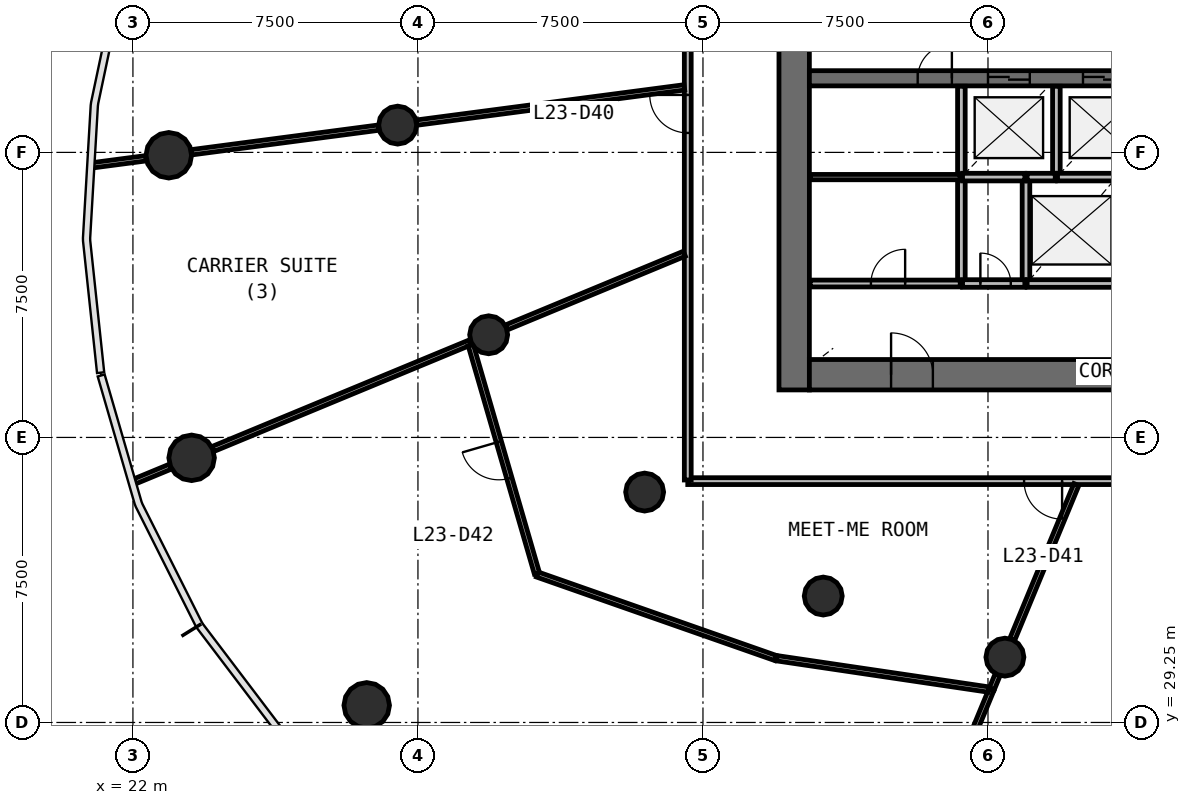
"""IFC4 building model, lengths in metres.
Left out: names, types, materials, properties, quantities, classifications, styles, units other than length and angle.
Written with IfcOpenShell. Run it as: python <this file> out.ifc"""

import sys

from ifc_helpers import new_model, si_unit, direction, frame, frame_2d, origin, origin_2d, place, context, subcontext, project, spatial, rectangle, circle, extrude, source, transform, mapped, element, fill, save


model = new_model("IFC4")
c1 = context("Model", 3, precision=1e-05, world=origin(), true_north=direction((0.0, 1.0)))
c2 = subcontext(c1, "Body", "Model", "MODEL_VIEW")
j1 = project(units=[si_unit("LENGTHUNIT", "METRE"), si_unit("PLANEANGLEUNIT", "RADIAN")], contexts=[c1])
p1 = place(None, origin())
s1 = spatial("IfcSite", under=j1, at=p1, CompositionType="ELEMENT")
p2 = place(p1, origin())
s2 = spatial("IfcBuilding", under=s1, at=p2, CompositionType="ELEMENT")
p3 = place(p2, frame((0.0, 0.0, 100.3)))
s3 = spatial("IfcBuildingStorey", under=s2, at=p3, CompositionType="ELEMENT", Elevation=100.3)
p4 = place(p3, frame((39.4, 58.0, 0.0), z_axis=(0.0, 0.0, 1.0), x_axis=(0.0, -1.0, 0.0)))
e1 = element("IfcWall", 1, at=p4, inside=s3, PredefinedType="SHEAR", context=c2, shape_type="SweptSolid", body=[
    extrude(rectangle(XDim=20.0, YDim=0.8, at=frame_2d((10.0, 0.0))), origin(), (0.0, 0.0, 1.0), 4.1),
])
p5 = place(p4, frame((9.1, 0.0, 0.0)))
e2 = element("IfcOpeningElement", 2, at=p5, cuts=e1, PredefinedType="OPENING", context=c2, shape_type="SweptSolid", body=[
    extrude(rectangle(XDim=1.8, YDim=2.1, at=frame_2d((0.9, 1.05))), frame((0.0, 0.41, 0.0), z_axis=(0.0, -1.0, 0.0), x_axis=(1.0, 0.0, 0.0)), (0.0, 0.0, 1.0), 0.82),
])
p6 = place(p3, frame((39.8, 38.4, 0.0), z_axis=(0.0, 0.0, 1.0), x_axis=(1.0, 0.0, 0.0)))
e3 = element("IfcWall", 3, at=p6, inside=s3, PredefinedType="SHEAR", context=c2, shape_type="SweptSolid", body=[
    extrude(rectangle(XDim=24.4, YDim=0.8, at=frame_2d((12.2, 0.0))), origin(), (0.0, 0.0, 1.0), 4.1),
])
p7 = place(p6, frame((21.65, 0.0, 0.0)))
e4 = element("IfcOpeningElement", 4, at=p7, cuts=e3, PredefinedType="OPENING", context=c2, shape_type="SweptSolid", body=[
    extrude(rectangle(XDim=1.1, YDim=2.1, at=frame_2d((0.55, 1.05))), frame((0.0, 0.41, 0.0), z_axis=(0.0, -1.0, 0.0), x_axis=(1.0, 0.0, 0.0)), (0.0, 0.0, 1.0), 0.82),
])
p8 = place(p6, frame((2.15, 0.0, 0.0)))
e5 = element("IfcOpeningElement", 5, at=p8, cuts=e3, PredefinedType="OPENING", context=c2, shape_type="SweptSolid", body=[
    extrude(rectangle(XDim=1.1, YDim=2.1, at=frame_2d((0.55, 1.05))), frame((0.0, 0.41, 0.0), z_axis=(0.0, -1.0, 0.0), x_axis=(1.0, 0.0, 0.0)), (0.0, 0.0, 1.0), 0.82),
])
p9 = place(p3, frame((39.8, 46.2, 0.0), z_axis=(0.0, 0.0, 1.0), x_axis=(1.0, 0.0, 0.0)))
e6 = element("IfcWall", 6, at=p9, inside=s3, PredefinedType="SHEAR", context=c2, shape_type="SweptSolid", body=[
    extrude(rectangle(XDim=24.4, YDim=0.4, at=frame_2d((12.2, 0.0))), origin(), (0.0, 0.0, 1.0), 4.1),
])
p10 = place(p9, frame((4.7, 0.0, 0.0)))
e7 = element("IfcOpeningElement", 7, at=p10, cuts=e6, PredefinedType="OPENING", context=c2, shape_type="SweptSolid", body=[
    extrude(rectangle(XDim=1.1, YDim=2.1, at=frame_2d((0.55, 1.05))), frame((0.0, 0.21, 0.0), z_axis=(0.0, -1.0, 0.0), x_axis=(1.0, 0.0, 0.0)), (0.0, 0.0, 1.0), 0.42),
])
p11 = place(p9, frame((7.2, 0.0, 0.0)))
e8 = element("IfcOpeningElement", 8, at=p11, cuts=e6, PredefinedType="OPENING", context=c2, shape_type="SweptSolid", body=[
    extrude(rectangle(XDim=1.1, YDim=2.1, at=frame_2d((0.55, 1.05))), frame((0.0, 0.21, 0.0), z_axis=(0.0, -1.0, 0.0), x_axis=(1.0, 0.0, 0.0)), (0.0, 0.0, 1.0), 0.42),
])
p12 = place(p9, frame((9.7, 0.0, 0.0)))
e9 = element("IfcOpeningElement", 9, at=p12, cuts=e6, PredefinedType="OPENING", context=c2, shape_type="SweptSolid", body=[
    extrude(rectangle(XDim=1.1, YDim=2.1, at=frame_2d((0.55, 1.05))), frame((0.0, 0.21, 0.0), z_axis=(0.0, -1.0, 0.0), x_axis=(1.0, 0.0, 0.0)), (0.0, 0.0, 1.0), 0.42),
])
p13 = place(p9, frame((20.65, 0.0, 0.0)))
e10 = element("IfcOpeningElement", 10, at=p13, cuts=e6, PredefinedType="OPENING", context=c2, shape_type="SweptSolid", body=[
    extrude(rectangle(XDim=0.9, YDim=2.1, at=frame_2d((0.45, 1.05))), frame((0.0, 0.21, 0.0), z_axis=(0.0, -1.0, 0.0), x_axis=(1.0, 0.0, 0.0)), (0.0, 0.0, 1.0), 0.42),
])
p14 = place(p9, frame((2.85, 0.0, 0.0)))
e11 = element("IfcOpeningElement", 11, at=p14, cuts=e6, PredefinedType="OPENING", context=c2, shape_type="SweptSolid", body=[
    extrude(rectangle(XDim=0.9, YDim=2.1, at=frame_2d((0.45, 1.05))), frame((0.0, 0.21, 0.0), z_axis=(0.0, -1.0, 0.0), x_axis=(1.0, 0.0, 0.0)), (0.0, 0.0, 1.0), 0.42),
])
p15 = place(p9, frame((11.85, 0.0, 0.0)))
e12 = element("IfcOpeningElement", 12, at=p15, cuts=e6, PredefinedType="OPENING", context=c2, shape_type="SweptSolid", body=[
    extrude(rectangle(XDim=0.9, YDim=2.1, at=frame_2d((0.45, 1.05))), frame((0.0, 0.21, 0.0), z_axis=(0.0, -1.0, 0.0), x_axis=(1.0, 0.0, 0.0)), (0.0, 0.0, 1.0), 0.42),
])
m1 = source(origin(), c2, "Body", "SweptSolid", [
    extrude(circle(Radius=0.6, at=origin_2d()), origin(), (0.0, 0.0, 1.0), 4.1),
])
for number, where, z_axis, x_axis in (
    (13, (22.944, 44.175, 0.0), (0.0, 0.0, 1.0), (1.0, 0.0, 0.0)),
    (14, (23.544, 36.213, 0.0), (0.0, 0.0, 1.0), (1.0, 0.0, 0.0)),
    (15, (28.152, 29.701, 0.0), (0.0, 0.0, 1.0), (1.0, 0.0, 0.0)),
):
    element("IfcColumn", number, at=place(p3, frame(where, z_axis=z_axis, x_axis=x_axis)), inside=s3, PredefinedType="COLUMN", context=c2, shape_type="MappedRepresentation", body=[
        mapped(m1, transform((0.0, 0.0, 0.0), scale=1.0)),
    ])
m2 = source(origin(), c2, "Body", "SweptSolid", [
    extrude(circle(Radius=0.5, at=origin_2d()), origin(), (0.0, 0.0, 1.0), 4.1),
])
for number, where, z_axis, x_axis in (
    (16, (28.966, 44.968, 0.0), (0.0, 0.0, 1.0), (1.0, 0.0, 0.0)),
    (17, (31.361, 39.451, 0.0), (0.0, 0.0, 1.0), (1.0, 0.0, 0.0)),
    (18, (35.465, 35.312, 0.0), (0.0, 0.0, 1.0), (1.0, 0.0, 0.0)),
    (19, (40.165, 32.576, 0.0), (0.0, 0.0, 1.0), (1.0, 0.0, 0.0)),
    (20, (44.945, 30.969, 0.0), (0.0, 0.0, 1.0), (1.0, 0.0, 0.0)),
):
    element("IfcColumn", number, at=place(p3, frame(where, z_axis=z_axis, x_axis=x_axis)), inside=s3, PredefinedType="COLUMN", context=c2, shape_type="MappedRepresentation", body=[
        mapped(m2, transform((0.0, 0.0, 0.0), scale=1.0)),
    ])
for number, where, z_axis, x_axis in (
    (21, (43.8, 43.6, 0.0), (0.0, 0.0, 1.0), (0.0, -1.0, 0.0)),
    (22, (45.5, 43.6, 0.0), (0.0, 0.0, 1.0), (0.0, -1.0, 0.0)),
):
    element("IfcWall", number, at=place(p3, frame(where, z_axis=z_axis, x_axis=x_axis)), inside=s3, PredefinedType="SOLIDWALL", context=c2, shape_type="SweptSolid", body=[
        extrude(rectangle(XDim=2.8, YDim=0.2, at=frame_2d((1.4, 0.0))), origin(), (0.0, 0.0, 1.0), 3.7),
    ])
p16 = place(p3, frame((45.53, 40.8, 0.0), z_axis=(0.0, 0.0, 1.0), x_axis=(1.0, 0.0, 0.0)))
e23 = element("IfcWall", 23, at=p16, inside=s3, PredefinedType="SOLIDWALL", context=c2, shape_type="SweptSolid", body=[
    extrude(rectangle(XDim=2.34, YDim=0.2, at=frame_2d((1.17, 0.0))), origin(), (0.0, 0.0, 1.0), 3.7),
])
p17 = place(p3, frame((43.8, 45.99, 0.0), z_axis=(0.0, 0.0, 1.0), x_axis=(0.0, -1.0, 0.0)))
e24 = element("IfcWall", 24, at=p17, inside=s3, PredefinedType="SOLIDWALL", context=c2, shape_type="SweptSolid", body=[
    extrude(rectangle(XDim=2.36, YDim=0.2, at=frame_2d((1.18, 0.0))), origin(), (0.0, 0.0, 1.0), 3.7),
])
p18 = place(p3, frame((46.3, 43.6, 0.0), z_axis=(0.0, 0.0, 1.0), x_axis=(0.0, 1.0, 0.0)))
e25 = element("IfcWall", 25, at=p18, inside=s3, PredefinedType="SOLIDWALL", context=c2, shape_type="SweptSolid", body=[
    extrude(rectangle(XDim=2.39, YDim=0.2, at=frame_2d((1.195, 0.0))), origin(), (0.0, 0.0, 1.0), 3.7),
])
p19 = place(p3, frame((43.83, 43.6, 0.0), z_axis=(0.0, 0.0, 1.0), x_axis=(1.0, 0.0, 0.0)))
e26 = element("IfcWall", 26, at=p19, inside=s3, PredefinedType="SOLIDWALL", context=c2, shape_type="SweptSolid", body=[
    extrude(rectangle(XDim=1.64, YDim=0.2, at=frame_2d((0.82, 0.0))), origin(), (0.0, 0.0, 1.0), 3.7),
])
p20 = place(p3, frame((43.83, 40.8, 0.0), z_axis=(0.0, 0.0, 1.0), x_axis=(1.0, 0.0, 0.0)))
e27 = element("IfcWall", 27, at=p20, inside=s3, PredefinedType="SOLIDWALL", context=c2, shape_type="SweptSolid", body=[
    extrude(rectangle(XDim=1.64, YDim=0.2, at=frame_2d((0.82, 0.0))), origin(), (0.0, 0.0, 1.0), 3.7),
])
p21 = place(p20, frame((0.47, 0.0, 0.0)))
e28 = element("IfcOpeningElement", 28, at=p21, cuts=e27, PredefinedType="OPENING", context=c2, shape_type="SweptSolid", body=[
    extrude(rectangle(XDim=0.8, YDim=2.1, at=frame_2d((0.4, 1.05))), frame((0.0, 0.11, 0.0), z_axis=(0.0, -1.0, 0.0), x_axis=(1.0, 0.0, 0.0)), (0.0, 0.0, 1.0), 0.22),
])
p22 = place(p3, frame((46.33, 43.6, 0.0), z_axis=(0.0, 0.0, 1.0), x_axis=(1.0, 0.0, 0.0)))
e29 = element("IfcWall", 29, at=p22, inside=s3, PredefinedType="SOLIDWALL", context=c2, shape_type="SweptSolid", body=[
    extrude(rectangle(XDim=1.54, YDim=0.2, at=frame_2d((0.77, 0.0))), origin(), (0.0, 0.0, 1.0), 3.7),
])
p23 = place(p3, frame((45.53, 43.6, 0.0), z_axis=(0.0, 0.0, 1.0), x_axis=(1.0, 0.0, 0.0)))
e30 = element("IfcWall", 30, at=p23, inside=s3, PredefinedType="SOLIDWALL", context=c2, shape_type="SweptSolid", body=[
    extrude(rectangle(XDim=0.74, YDim=0.2, at=frame_2d((0.37, 0.0))), origin(), (0.0, 0.0, 1.0), 3.7),
])
p24 = place(p3, frame((67.4, 35.6, 0.0), z_axis=(0.0, 0.0, 1.0), x_axis=(-1.0, 0.0, 0.0)))
e31 = element("IfcWall", 31, at=p24, inside=s3, PredefinedType="PARTITIONING", context=c2, shape_type="SweptSolid", body=[
    extrude(rectangle(XDim=30.8, YDim=0.18, at=frame_2d((15.4, 0.0))), origin(), (0.0, 0.0, 1.0), 2.9),
])
p25 = place(p24, frame((9.05, 0.0, 0.0)))
e32 = element("IfcOpeningElement", 32, at=p25, cuts=e31, PredefinedType="OPENING", context=c2, shape_type="SweptSolid", body=[
    extrude(rectangle(XDim=0.9, YDim=2.1, at=frame_2d((0.45, 1.05))), frame((0.0, 0.1, 0.0), z_axis=(0.0, -1.0, 0.0), x_axis=(1.0, 0.0, 0.0)), (0.0, 0.0, 1.0), 0.2),
])
p26 = place(p24, frame((6.05, 0.0, 0.0)))
e33 = element("IfcOpeningElement", 33, at=p26, cuts=e31, PredefinedType="OPENING", context=c2, shape_type="SweptSolid", body=[
    extrude(rectangle(XDim=0.9, YDim=2.1, at=frame_2d((0.45, 1.05))), frame((0.0, 0.1, 0.0), z_axis=(0.0, -1.0, 0.0), x_axis=(1.0, 0.0, 0.0)), (0.0, 0.0, 1.0), 0.2),
])
p27 = place(p24, frame((2.45, 0.0, 0.0)))
e34 = element("IfcOpeningElement", 34, at=p27, cuts=e31, PredefinedType="OPENING", context=c2, shape_type="SweptSolid", body=[
    extrude(rectangle(XDim=0.9, YDim=2.1, at=frame_2d((0.45, 1.05))), frame((0.0, 0.1, 0.0), z_axis=(0.0, -1.0, 0.0), x_axis=(1.0, 0.0, 0.0)), (0.0, 0.0, 1.0), 0.2),
])
p28 = place(p24, frame((20.95, 0.0, 0.0)))
e35 = element("IfcOpeningElement", 35, at=p28, cuts=e31, PredefinedType="OPENING", context=c2, shape_type="SweptSolid", body=[
    extrude(rectangle(XDim=1.0, YDim=2.1, at=frame_2d((0.5, 1.05))), frame((0.0, 0.1, 0.0), z_axis=(0.0, -1.0, 0.0), x_axis=(1.0, 0.0, 0.0)), (0.0, 0.0, 1.0), 0.2),
])
p29 = place(p24, frame((14.95, 0.0, 0.0)))
e36 = element("IfcOpeningElement", 36, at=p29, cuts=e31, PredefinedType="OPENING", context=c2, shape_type="SweptSolid", body=[
    extrude(rectangle(XDim=1.0, YDim=2.1, at=frame_2d((0.5, 1.05))), frame((0.0, 0.1, 0.0), z_axis=(0.0, -1.0, 0.0), x_axis=(1.0, 0.0, 0.0)), (0.0, 0.0, 1.0), 0.2),
])
p30 = place(p24, frame((12.55, 0.0, 0.0)))
e37 = element("IfcOpeningElement", 37, at=p30, cuts=e31, PredefinedType="OPENING", context=c2, shape_type="SweptSolid", body=[
    extrude(rectangle(XDim=1.0, YDim=2.1, at=frame_2d((0.5, 1.05))), frame((0.0, 0.1, 0.0), z_axis=(0.0, -1.0, 0.0), x_axis=(1.0, 0.0, 0.0)), (0.0, 0.0, 1.0), 0.2),
])
p31 = place(p3, frame((36.6, 35.63, 0.0), z_axis=(0.0, 0.0, 1.0), x_axis=(0.0, 1.0, 0.0)))
e38 = element("IfcWall", 38, at=p31, inside=s3, PredefinedType="PARTITIONING", context=c2, shape_type="SweptSolid", body=[
    extrude(rectangle(XDim=23.583, YDim=0.18, at=frame_2d((11.791, 0.0))), origin(), (0.0, 0.0, 1.0), 2.9),
])
p32 = place(p31, frame((11.333, 0.0, 0.0)))
e39 = element("IfcOpeningElement", 39, at=p32, cuts=e38, PredefinedType="OPENING", context=c2, shape_type="SweptSolid", body=[
    extrude(rectangle(XDim=1.0, YDim=2.1, at=frame_2d((0.5, 1.05))), frame((0.0, 0.1, 0.0), z_axis=(0.0, -1.0, 0.0), x_axis=(1.0, 0.0, 0.0)), (0.0, 0.0, 1.0), 0.2),
])
p33 = place(p31, frame((9.133, 0.0, 0.0)))
e40 = element("IfcOpeningElement", 40, at=p33, cuts=e38, PredefinedType="OPENING", context=c2, shape_type="SweptSolid", body=[
    extrude(rectangle(XDim=1.0, YDim=2.1, at=frame_2d((0.5, 1.05))), frame((0.0, 0.1, 0.0), z_axis=(0.0, -1.0, 0.0), x_axis=(1.0, 0.0, 0.0)), (0.0, 0.0, 1.0), 0.2),
])
p34 = place(p3, frame((39.82, 40.8, 0.0), z_axis=(0.0, 0.0, 1.0), x_axis=(1.0, 0.0, 0.0)))
e41 = element("IfcWall", 41, at=p34, inside=s3, PredefinedType="PARTITIONING", context=c2, shape_type="SweptSolid", body=[
    extrude(rectangle(XDim=3.95, YDim=0.18, at=frame_2d((1.975, 0.0))), origin(), (0.0, 0.0, 1.0), 3.7),
])
p35 = place(p34, frame((1.6, 0.0, 0.0)))
e42 = element("IfcOpeningElement", 42, at=p35, cuts=e41, PredefinedType="OPENING", context=c2, shape_type="SweptSolid", body=[
    extrude(rectangle(XDim=0.9, YDim=2.1, at=frame_2d((0.45, 1.05))), frame((0.0, 0.1, 0.0), z_axis=(0.0, -1.0, 0.0), x_axis=(1.0, 0.0, 0.0)), (0.0, 0.0, 1.0), 0.2),
])
p36 = place(p3, frame((30.87, 39.248, 0.0), z_axis=(0.0, 0.0, 1.0), x_axis=(-0.923871790576, -0.382702122514, 0.0)))
e43 = element("IfcWall", 43, at=p36, inside=s3, PredefinedType="PARTITIONING", context=c2, shape_type="SweptSolid", body=[
    extrude(rectangle(XDim=7.324, YDim=0.14, at=frame_2d((3.662, 0.0))), origin(), (0.0, 0.0, 1.0), 2.9),
])
p37 = place(p3, frame((36.51, 45.961, 0.0), z_axis=(0.0, 0.0, 1.0), x_axis=(-0.99144622305, -0.130515848849, 0.0)))
e44 = element("IfcWall", 44, at=p37, inside=s3, PredefinedType="PARTITIONING", context=c2, shape_type="SweptSolid", body=[
    extrude(rectangle(XDim=7.104, YDim=0.14, at=frame_2d((3.552, 0.0))), origin(), (0.0, 0.0, 1.0), 2.9),
])
p38 = place(p3, frame((32.639, 33.144, 0.0), z_axis=(0.0, 0.0, 1.0), x_axis=(0.943712844309, -0.330765880173, 0.0)))
e45 = element("IfcWall", 45, at=p38, inside=s3, PredefinedType="PARTITIONING", context=c2, shape_type="SweptSolid", body=[
    extrude(rectangle(XDim=6.648, YDim=0.14, at=frame_2d((3.324, 0.0))), origin(), (0.0, 0.0, 1.0), 2.9),
])
p39 = place(p3, frame((32.631, 33.173, 0.0), z_axis=(0.0, 0.0, 1.0), x_axis=(-0.278343340878, 0.960481641984, 0.0)))
e46 = element("IfcWall", 46, at=p39, inside=s3, PredefinedType="PARTITIONING", context=c2, shape_type="SweptSolid", body=[
    extrude(rectangle(XDim=6.255, YDim=0.14, at=frame_2d((3.127, 0.0))), origin(), (0.0, 0.0, 1.0), 2.9),
])
p40 = place(p39, frame((2.604, 0.0, 0.0)))
e47 = element("IfcOpeningElement", 47, at=p40, cuts=e46, PredefinedType="OPENING", context=c2, shape_type="SweptSolid", body=[
    extrude(rectangle(XDim=1.0, YDim=2.1, at=frame_2d((0.5, 1.05))), frame((0.0, 0.08, 0.0), z_axis=(0.0, -1.0, 0.0), x_axis=(1.0, 0.0, 0.0)), (0.0, 0.0, 1.0), 0.16),
])
p41 = place(p3, frame((44.588, 30.106, 0.0), z_axis=(0.0, 0.0, 1.0), x_axis=(-0.382687319502, -0.923877922397, 0.0)))
e48 = element("IfcWall", 48, at=p41, inside=s3, PredefinedType="PARTITIONING", context=c2, shape_type="SweptSolid", body=[
    extrude(rectangle(XDim=6.234, YDim=0.14, at=frame_2d((3.117, 0.0))), origin(), (0.0, 0.0, 1.0), 2.9),
])
p42 = place(p3, frame((38.943, 30.94, 0.0), z_axis=(0.0, 0.0, 1.0), x_axis=(0.98924251215, -0.146284832283, 0.0)))
e49 = element("IfcWall", 49, at=p42, inside=s3, PredefinedType="PARTITIONING", context=c2, shape_type="SweptSolid", body=[
    extrude(rectangle(XDim=5.634, YDim=0.14, at=frame_2d((2.817, 0.0))), origin(), (0.0, 0.0, 1.0), 2.9),
])
p43 = place(p3, frame((36.51, 41.584, 0.0), z_axis=(0.0, 0.0, 1.0), x_axis=(-0.923890025086, -0.382658100067, 0.0)))
e50 = element("IfcWall", 50, at=p43, inside=s3, PredefinedType="PARTITIONING", context=c2, shape_type="SweptSolid", body=[
    extrude(rectangle(XDim=5.068, YDim=0.14, at=frame_2d((2.534, 0.0))), origin(), (0.0, 0.0, 1.0), 2.9),
])
p44 = place(p3, frame((28.466, 44.902, 0.0), z_axis=(0.0, 0.0, 1.0), x_axis=(-0.991443414541, -0.130537181533, 0.0)))
e51 = element("IfcWall", 51, at=p44, inside=s3, PredefinedType="PARTITIONING", context=c2, shape_type="SweptSolid", body=[
    extrude(rectangle(XDim=4.966, YDim=0.14, at=frame_2d((2.483, 0.0))), origin(), (0.0, 0.0, 1.0), 2.9),
])
p45 = place(p3, frame((46.826, 35.51, 0.0), z_axis=(0.0, 0.0, 1.0), x_axis=(-0.382672831764, -0.923883923353, 0.0)))
e52 = element("IfcWall", 52, at=p45, inside=s3, PredefinedType="PARTITIONING", context=c2, shape_type="SweptSolid", body=[
    extrude(rectangle(XDim=4.41, YDim=0.14, at=frame_2d((2.205, 0.0))), origin(), (0.0, 0.0, 1.0), 2.9),
])
p46 = place(p3, frame((43.77, 43.6, 0.0), z_axis=(0.0, 0.0, 1.0), x_axis=(-1.0, 0.0, 0.0)))
e53 = element("IfcWall", 53, at=p46, inside=s3, PredefinedType="PARTITIONING", context=c2, shape_type="SweptSolid", body=[
    extrude(rectangle(XDim=3.95, YDim=0.14, at=frame_2d((1.975, 0.0))), origin(), (0.0, 0.0, 1.0), 2.9),
])
p47 = place(p3, frame((22.344, 44.096, 0.0), z_axis=(0.0, 0.0, 1.0), x_axis=(-0.991440859851, -0.130556583206, 0.0)))
e54 = element("IfcWall", 54, at=p47, inside=s3, PredefinedType="PARTITIONING", context=c2, shape_type="SweptSolid", body=[
    extrude(rectangle(XDim=1.423, YDim=0.14, at=frame_2d((0.711, 0.0))), origin(), (0.0, 0.0, 1.0), 2.9),
])
p48 = place(p3, frame((22.986, 35.982, 0.0), z_axis=(0.0, 0.0, 1.0), x_axis=(-0.923909071339, -0.38261211154, 0.0)))
e55 = element("IfcWall", 55, at=p48, inside=s3, PredefinedType="PARTITIONING", context=c2, shape_type="SweptSolid", body=[
    extrude(rectangle(XDim=1.021, YDim=0.14, at=frame_2d((0.511, 0.0))), origin(), (0.0, 0.0, 1.0), 2.9),
])
p49 = place(p3, frame((44.752, 30.502, 0.0), z_axis=(0.0, 0.0, 1.0), x_axis=(-0.382441868588, -0.923979554509, 0.0)))
e56 = element("IfcWall", 56, at=p49, inside=s3, PredefinedType="PARTITIONING", context=c2, shape_type="SweptSolid", body=[
    extrude(rectangle(XDim=0.399, YDim=0.14, at=frame_2d((0.199, 0.0))), origin(), (0.0, 0.0, 1.0), 2.9),
])
m3 = source(origin(), c2, "Body", "SweptSolid", [
    extrude(rectangle(XDim=1.1, YDim=2.1, at=frame_2d((0.55, 1.05))), frame((0.0, 0.025, 0.0), z_axis=(0.0, -1.0, 0.0), x_axis=(1.0, 0.0, 0.0)), (0.0, 0.0, 1.0), 0.05),
])
p50 = place(p10, origin())
e57 = element("IfcDoor", 57, at=p50, inside=s3, OperationType="DOUBLE_DOOR_SLIDING", PredefinedType="USERDEFINED", context=c2, shape_type="MappedRepresentation", body=[
    mapped(m3, transform((0.0, 0.0, 0.0), scale=1.0)),
])
fill(e7, e57)
p51 = place(p11, origin())
e58 = element("IfcDoor", 58, at=p51, inside=s3, OperationType="DOUBLE_DOOR_SLIDING", PredefinedType="USERDEFINED", context=c2, shape_type="MappedRepresentation", body=[
    mapped(m3, transform((0.0, 0.0, 0.0), scale=1.0)),
])
fill(e8, e58)
m4 = source(origin(), c2, "Body", "SweptSolid", [
    extrude(rectangle(XDim=0.8, YDim=2.1, at=frame_2d((0.4, 1.05))), frame((0.0, 0.025, 0.0), z_axis=(0.0, -1.0, 0.0), x_axis=(1.0, 0.0, 0.0)), (0.0, 0.0, 1.0), 0.05),
])
p52 = place(p21, origin())
e59 = element("IfcDoor", 59, at=p52, inside=s3, OperationType="SINGLE_SWING_LEFT", PredefinedType="DOOR", context=c2, shape_type="MappedRepresentation", body=[
    mapped(m4, transform((0.0, 0.0, 0.0), scale=1.0)),
])
fill(e28, e59)
m5 = source(origin(), c2, "Body", "SweptSolid", [
    extrude(rectangle(XDim=1.1, YDim=2.1, at=frame_2d((0.55, 1.05))), frame((0.0, 0.025, 0.0), z_axis=(0.0, -1.0, 0.0), x_axis=(1.0, 0.0, 0.0)), (0.0, 0.0, 1.0), 0.05),
])
p53 = place(p8, origin())
e60 = element("IfcDoor", 60, at=p53, inside=s3, OperationType="SINGLE_SWING_LEFT", PredefinedType="DOOR", context=c2, shape_type="MappedRepresentation", body=[
    mapped(m5, transform((0.0, 0.0, 0.0), scale=1.0)),
])
fill(e5, e60)
m6 = source(origin(), c2, "Body", "SweptSolid", [
    extrude(rectangle(XDim=1.0, YDim=2.1, at=frame_2d((0.5, 1.05))), frame((0.0, 0.025, 0.0), z_axis=(0.0, -1.0, 0.0), x_axis=(1.0, 0.0, 0.0)), (0.0, 0.0, 1.0), 0.05),
])
p54 = place(p33, origin())
e61 = element("IfcDoor", 61, at=p54, inside=s3, OperationType="SINGLE_SWING_RIGHT", PredefinedType="DOOR", context=c2, shape_type="MappedRepresentation", body=[
    mapped(m6, transform((0.0, 0.0, 0.0), scale=1.0)),
])
fill(e40, e61)
p55 = place(p28, origin())
e62 = element("IfcDoor", 62, at=p55, inside=s3, OperationType="SINGLE_SWING_LEFT", PredefinedType="DOOR", context=c2, shape_type="MappedRepresentation", body=[
    mapped(m6, transform((0.0, 0.0, 0.0), scale=1.0)),
])
fill(e35, e62)
p56 = place(p40, origin())
e63 = element("IfcDoor", 63, at=p56, inside=s3, OperationType="SINGLE_SWING_RIGHT", PredefinedType="DOOR", context=c2, shape_type="MappedRepresentation", body=[
    mapped(m6, transform((0.0, 0.0, 0.0), scale=1.0)),
])
fill(e47, e63)
m7 = source(origin(), c2, "Body", "SweptSolid", [
    extrude(rectangle(XDim=0.9, YDim=2.1, at=frame_2d((0.45, 1.05))), frame((0.0, 0.025, 0.0), z_axis=(0.0, -1.0, 0.0), x_axis=(1.0, 0.0, 0.0)), (0.0, 0.0, 1.0), 0.05),
])
p57 = place(p35, origin())
e64 = element("IfcDoor", 64, at=p57, inside=s3, OperationType="SINGLE_SWING_RIGHT", PredefinedType="DOOR", context=c2, shape_type="MappedRepresentation", body=[
    mapped(m7, transform((0.0, 0.0, 0.0), scale=1.0)),
])
fill(e42, e64)
p58 = place(p14, origin())
e65 = element("IfcDoor", 65, at=p58, inside=s3, OperationType="SINGLE_SWING_RIGHT", PredefinedType="DOOR", context=c2, shape_type="MappedRepresentation", body=[
    mapped(m7, transform((0.0, 0.0, 0.0), scale=1.0)),
])
fill(e11, e65)
save(model, sys.argv[1])
